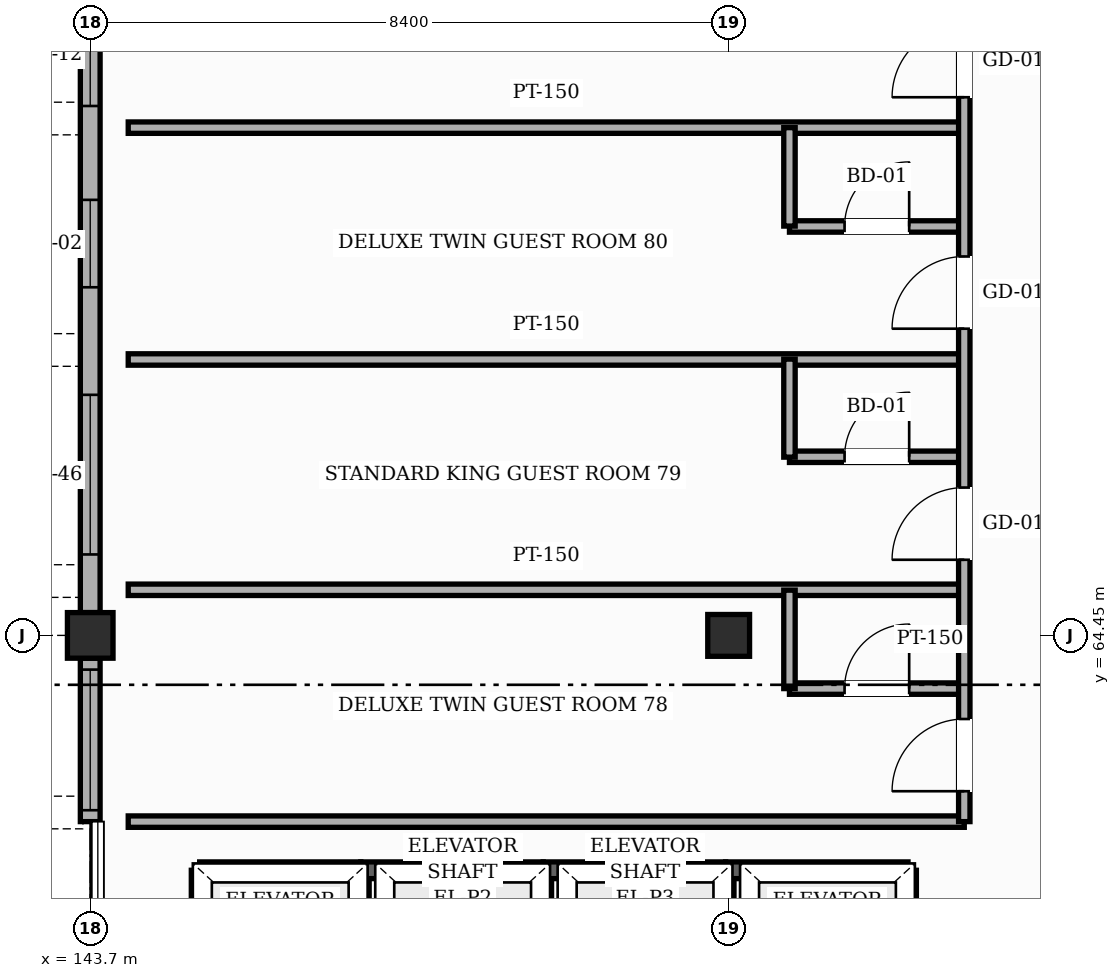
"""IFC4 building model, lengths in metres.
Left out: names, types, materials, properties, quantities, classifications, styles, units other than length and angle.
Written with IfcOpenShell. Run it as: python <this file> out.ifc"""

import sys

from ifc_helpers import new_model, si_unit, direction, frame, frame_2d, origin, origin_2d, place, context, subcontext, project, spatial, rectangle, hollow_rectangle, extrude, element, fill, save


model = new_model("IFC4")
c1 = context("Model", 3, precision=1e-05, world=origin(), true_north=direction((0.0, 1.0)))
c2 = subcontext(c1, "Body", "Model", "MODEL_VIEW")
j1 = project(units=[si_unit("LENGTHUNIT", "METRE"), si_unit("PLANEANGLEUNIT", "RADIAN")], contexts=[c1])
p1 = place(None, origin())
s1 = spatial("IfcSite", under=j1, at=p1, CompositionType="ELEMENT")
p2 = place(p1, origin())
s2 = spatial("IfcBuilding", under=s1, at=p2, CompositionType="ELEMENT")
p3 = place(p2, frame((0.0, 0.0, 24.6)))
s3 = spatial("IfcBuildingStorey", under=s2, at=p3, CompositionType="ELEMENT", Elevation=24.6)
p4 = place(p3, frame((143.7, 64.45, 0.0), z_axis=(0.0, 0.0, 1.0), x_axis=(1.0, 0.0, 0.0)))
e1 = element("IfcColumn", 1, at=p4, inside=s3, PredefinedType="COLUMN", context=c2, shape_type="SweptSolid", body=[
    extrude(hollow_rectangle(XDim=0.6, YDim=0.6, WallThickness=0.025, InnerFilletRadius=0.025, OuterFilletRadius=0.05, at=origin_2d()), origin(), (0.0, 0.0, 1.0), 3.6),
])
p5 = place(p3, frame((152.1, 64.45, 0.0), z_axis=(0.0, 0.0, 1.0), x_axis=(1.0, 0.0, 0.0)))
e2 = element("IfcColumn", 2, at=p5, inside=s3, PredefinedType="COLUMN", context=c2, shape_type="SweptSolid", body=[
    extrude(hollow_rectangle(XDim=0.55, YDim=0.55, WallThickness=0.022, InnerFilletRadius=0.022, OuterFilletRadius=0.044, at=origin_2d()), origin(), (0.0, 0.0, 1.0), 3.6),
])
p6 = place(p3, frame((143.7, 62.0, 0.0), z_axis=(0.0, 0.0, 1.0), x_axis=(0.0, 1.0, 0.0)))
e3 = element("IfcWall", 3, at=p6, inside=s3, PredefinedType="SOLIDWALL", context=c2, shape_type="SweptSolid", body=[
    extrude(rectangle(XDim=2.15, YDim=0.26, at=frame_2d((1.075, 0.0))), origin(), (0.0, 0.0, 1.0), 2.805),
])
p7 = place(p6, frame((0.15, 0.0, 0.85)))
e4 = element("IfcOpeningElement", 4, at=p7, cuts=e3, PredefinedType="OPENING", context=c2, shape_type="SweptSolid", body=[
    extrude(rectangle(XDim=1.85, YDim=1.35, at=frame_2d((0.925, 0.675))), frame((0.0, 0.14, 0.0), z_axis=(0.0, -1.0, 0.0), x_axis=(1.0, 0.0, 0.0)), (0.0, 0.0, 1.0), 0.28),
])
p8 = place(p3, frame((143.7, 64.75, 0.0), z_axis=(0.0, 0.0, 1.0), x_axis=(0.0, 1.0, 0.0)))
e5 = element("IfcWall", 5, at=p8, inside=s3, PredefinedType="SOLIDWALL", context=c2, shape_type="SweptSolid", body=[
    extrude(rectangle(XDim=8.3, YDim=0.26, at=frame_2d((4.15, 0.0))), origin(), (0.0, 0.0, 1.0), 2.655),
])
p9 = place(p8, frame((0.765, 0.0, 0.85)))
e6 = element("IfcOpeningElement", 6, at=p9, cuts=e5, PredefinedType="OPENING", context=c2, shape_type="SweptSolid", body=[
    extrude(rectangle(XDim=2.1, YDim=1.35, at=frame_2d((1.05, 0.675))), frame((0.0, 0.14, 0.0), z_axis=(0.0, -1.0, 0.0), x_axis=(1.0, 0.0, 0.0)), (0.0, 0.0, 1.0), 0.28),
])
p10 = place(p8, frame((4.28, 0.0, 0.85)))
e7 = element("IfcOpeningElement", 7, at=p10, cuts=e5, PredefinedType="OPENING", context=c2, shape_type="SweptSolid", body=[
    extrude(rectangle(XDim=1.15, YDim=1.5, at=frame_2d((0.575, 0.75))), frame((0.0, 0.14, 0.0), z_axis=(0.0, -1.0, 0.0), x_axis=(1.0, 0.0, 0.0)), (0.0, 0.0, 1.0), 0.28),
])
p11 = place(p8, frame((6.665, 0.0, 0.85)))
e8 = element("IfcOpeningElement", 8, at=p11, cuts=e5, PredefinedType="OPENING", context=c2, shape_type="SweptSolid", body=[
    extrude(rectangle(XDim=1.35, YDim=1.5, at=frame_2d((0.675, 0.75))), frame((0.0, 0.14, 0.0), z_axis=(0.0, -1.0, 0.0), x_axis=(1.0, 0.0, 0.0)), (0.0, 0.0, 1.0), 0.28),
])
p12 = place(p3, frame((145.14, 61.36, 0.0), z_axis=(0.0, 0.0, 1.0), x_axis=(1.0, 0.0, 0.0)))
e9 = element("IfcWall", 9, at=p12, inside=s3, PredefinedType="SHEAR", context=c2, shape_type="SweptSolid", body=[
    extrude(rectangle(XDim=2.12, YDim=0.22, at=frame_2d((1.06, 0.0))), origin(), (0.0, 0.0, 1.0), 3.38),
])
for number, where, z_axis, x_axis in (
    (10, (147.26, 59.44, 0.0), (0.0, 0.0, 1.0), (0.0, 1.0, 0.0)),
    (11, (145.14, 59.44, 0.0), (0.0, 0.0, 1.0), (0.0, 1.0, 0.0)),
):
    element("IfcWall", number, at=place(p3, frame(where, z_axis=z_axis, x_axis=x_axis)), inside=s3, PredefinedType="SHEAR", context=c2, shape_type="SweptSolid", body=[
        extrude(rectangle(XDim=1.92, YDim=0.22, at=frame_2d((0.96, 0.0))), origin(), (0.0, 0.0, 1.0), 3.38),
    ])
p13 = place(p3, frame((147.26, 61.36, 0.0), z_axis=(0.0, 0.0, 1.0), x_axis=(1.0, 0.0, 0.0)))
e12 = element("IfcWall", 12, at=p13, inside=s3, PredefinedType="SHEAR", context=c2, shape_type="SweptSolid", body=[
    extrude(rectangle(XDim=2.4, YDim=0.22, at=frame_2d((1.2, 0.0))), origin(), (0.0, 0.0, 1.0), 3.38),
])
p14 = place(p3, frame((149.66, 59.44, 0.0), z_axis=(0.0, 0.0, 1.0), x_axis=(0.0, 1.0, 0.0)))
e13 = element("IfcWall", 13, at=p14, inside=s3, PredefinedType="SHEAR", context=c2, shape_type="SweptSolid", body=[
    extrude(rectangle(XDim=1.92, YDim=0.22, at=frame_2d((0.96, 0.0))), origin(), (0.0, 0.0, 1.0), 3.38),
])
p15 = place(p3, frame((149.66, 61.36, 0.0), z_axis=(0.0, 0.0, 1.0), x_axis=(1.0, 0.0, 0.0)))
e14 = element("IfcWall", 14, at=p15, inside=s3, PredefinedType="SHEAR", context=c2, shape_type="SweptSolid", body=[
    extrude(rectangle(XDim=2.4, YDim=0.22, at=frame_2d((1.2, 0.0))), origin(), (0.0, 0.0, 1.0), 3.38),
])
p16 = place(p3, frame((152.06, 59.44, 0.0), z_axis=(0.0, 0.0, 1.0), x_axis=(0.0, 1.0, 0.0)))
e15 = element("IfcWall", 15, at=p16, inside=s3, PredefinedType="SHEAR", context=c2, shape_type="SweptSolid", body=[
    extrude(rectangle(XDim=1.92, YDim=0.22, at=frame_2d((0.96, 0.0))), origin(), (0.0, 0.0, 1.0), 3.38),
])
p17 = place(p3, frame((152.06, 61.36, 0.0), z_axis=(0.0, 0.0, 1.0), x_axis=(1.0, 0.0, 0.0)))
e16 = element("IfcWall", 16, at=p17, inside=s3, PredefinedType="SHEAR", context=c2, shape_type="SweptSolid", body=[
    extrude(rectangle(XDim=2.4, YDim=0.22, at=frame_2d((1.2, 0.0))), origin(), (0.0, 0.0, 1.0), 3.38),
])
p18 = place(p3, frame((154.46, 59.44, 0.0), z_axis=(0.0, 0.0, 1.0), x_axis=(0.0, 1.0, 0.0)))
e17 = element("IfcWall", 17, at=p18, inside=s3, PredefinedType="SHEAR", context=c2, shape_type="SweptSolid", body=[
    extrude(rectangle(XDim=1.92, YDim=0.22, at=frame_2d((0.96, 0.0))), origin(), (0.0, 0.0, 1.0), 3.38),
])
p19 = place(p3, frame((144.2, 62.0, 0.0), z_axis=(0.0, 0.0, 1.0), x_axis=(1.0, 0.0, 0.0)))
e18 = element("IfcWall", 18, at=p19, inside=s3, PredefinedType="PARTITIONING", context=c2, shape_type="SweptSolid", body=[
    extrude(rectangle(XDim=11.0, YDim=0.15, at=frame_2d((5.5, 0.0))), origin(), (0.0, 0.0, 1.0), 3.365),
])
p20 = place(p3, frame((152.9, 63.75, 0.0), z_axis=(0.0, 0.0, 1.0), x_axis=(1.0, 0.0, 0.0)))
e19 = element("IfcWall", 19, at=p20, inside=s3, PredefinedType="PARTITIONING", context=c2, shape_type="SweptSolid", body=[
    extrude(rectangle(XDim=2.3, YDim=0.15, at=frame_2d((1.15, 0.0))), origin(), (0.0, 0.0, 1.0), 3.365),
])
p21 = place(p20, frame((0.725, 0.0, 0.0)))
e20 = element("IfcOpeningElement", 20, at=p21, cuts=e19, PredefinedType="OPENING", context=c2, shape_type="SweptSolid", body=[
    extrude(rectangle(XDim=0.85, YDim=2.1, at=frame_2d((0.425, 1.05))), frame((0.0, 0.085, 0.0), z_axis=(0.0, -1.0, 0.0), x_axis=(1.0, 0.0, 0.0)), (0.0, 0.0, 1.0), 0.17),
])
p22 = place(p3, frame((144.2, 65.05, 0.0), z_axis=(0.0, 0.0, 1.0), x_axis=(1.0, 0.0, 0.0)))
e21 = element("IfcWall", 21, at=p22, inside=s3, PredefinedType="PARTITIONING", context=c2, shape_type="SweptSolid", body=[
    extrude(rectangle(XDim=11.0, YDim=0.15, at=frame_2d((5.5, 0.0))), origin(), (0.0, 0.0, 1.0), 3.365),
])
p23 = place(p3, frame((152.9, 66.8, 0.0), z_axis=(0.0, 0.0, 1.0), x_axis=(1.0, 0.0, 0.0)))
e22 = element("IfcWall", 22, at=p23, inside=s3, PredefinedType="PARTITIONING", context=c2, shape_type="SweptSolid", body=[
    extrude(rectangle(XDim=2.3, YDim=0.15, at=frame_2d((1.15, 0.0))), origin(), (0.0, 0.0, 1.0), 3.365),
])
p24 = place(p23, frame((0.725, 0.0, 0.0)))
e23 = element("IfcOpeningElement", 23, at=p24, cuts=e22, PredefinedType="OPENING", context=c2, shape_type="SweptSolid", body=[
    extrude(rectangle(XDim=0.85, YDim=2.1, at=frame_2d((0.425, 1.05))), frame((0.0, 0.085, 0.0), z_axis=(0.0, -1.0, 0.0), x_axis=(1.0, 0.0, 0.0)), (0.0, 0.0, 1.0), 0.17),
])
p25 = place(p3, frame((144.2, 68.08, 0.0), z_axis=(0.0, 0.0, 1.0), x_axis=(1.0, 0.0, 0.0)))
e24 = element("IfcWall", 24, at=p25, inside=s3, PredefinedType="PARTITIONING", context=c2, shape_type="SweptSolid", body=[
    extrude(rectangle(XDim=11.0, YDim=0.15, at=frame_2d((5.5, 0.0))), origin(), (0.0, 0.0, 1.0), 3.365),
])
p26 = place(p3, frame((152.9, 69.83, 0.0), z_axis=(0.0, 0.0, 1.0), x_axis=(1.0, 0.0, 0.0)))
e25 = element("IfcWall", 25, at=p26, inside=s3, PredefinedType="PARTITIONING", context=c2, shape_type="SweptSolid", body=[
    extrude(rectangle(XDim=2.3, YDim=0.15, at=frame_2d((1.15, 0.0))), origin(), (0.0, 0.0, 1.0), 3.365),
])
p27 = place(p26, frame((0.725, 0.0, 0.0)))
e26 = element("IfcOpeningElement", 26, at=p27, cuts=e25, PredefinedType="OPENING", context=c2, shape_type="SweptSolid", body=[
    extrude(rectangle(XDim=0.85, YDim=2.1, at=frame_2d((0.425, 1.05))), frame((0.0, 0.085, 0.0), z_axis=(0.0, -1.0, 0.0), x_axis=(1.0, 0.0, 0.0)), (0.0, 0.0, 1.0), 0.17),
])
p28 = place(p3, frame((144.2, 71.13, 0.0), z_axis=(0.0, 0.0, 1.0), x_axis=(1.0, 0.0, 0.0)))
e27 = element("IfcWall", 27, at=p28, inside=s3, PredefinedType="PARTITIONING", context=c2, shape_type="SweptSolid", body=[
    extrude(rectangle(XDim=11.0, YDim=0.15, at=frame_2d((5.5, 0.0))), origin(), (0.0, 0.0, 1.0), 3.365),
])
p29 = place(p3, frame((152.9, 63.75, 0.0), z_axis=(0.0, 0.0, 1.0), x_axis=(0.0, 1.0, 0.0)))
e28 = element("IfcWall", 28, at=p29, inside=s3, PredefinedType="PARTITIONING", context=c2, shape_type="SweptSolid", body=[
    extrude(rectangle(XDim=1.295, YDim=0.15, at=frame_2d((0.647, 0.0))), origin(), (0.0, 0.0, 1.0), 3.365),
])
p30 = place(p3, frame((152.9, 66.795, 0.0), z_axis=(0.0, 0.0, 1.0), x_axis=(0.0, 1.0, 0.0)))
e29 = element("IfcWall", 29, at=p30, inside=s3, PredefinedType="PARTITIONING", context=c2, shape_type="SweptSolid", body=[
    extrude(rectangle(XDim=1.29, YDim=0.15, at=frame_2d((0.645, 0.0))), origin(), (0.0, 0.0, 1.0), 3.365),
])
p31 = place(p3, frame((152.9, 69.835, 0.0), z_axis=(0.0, 0.0, 1.0), x_axis=(0.0, 1.0, 0.0)))
e30 = element("IfcWall", 30, at=p31, inside=s3, PredefinedType="PARTITIONING", context=c2, shape_type="SweptSolid", body=[
    extrude(rectangle(XDim=1.295, YDim=0.15, at=frame_2d((0.647, 0.0))), origin(), (0.0, 0.0, 1.0), 3.365),
])
p32 = place(p3, frame((155.2, 62.0, 0.0), z_axis=(0.0, 0.0, 1.0), x_axis=(0.0, 1.0, 0.0)))
e31 = element("IfcWall", 31, at=p32, inside=s3, PredefinedType="PARTITIONING", context=c2, shape_type="SweptSolid", body=[
    extrude(rectangle(XDim=42.6, YDim=0.15, at=frame_2d((21.3, 0.0))), origin(), (0.0, 0.0, 1.0), 3.365),
])
p33 = place(p32, frame((0.4, 0.0, 0.0)))
e32 = element("IfcOpeningElement", 32, at=p33, cuts=e31, PredefinedType="OPENING", context=c2, shape_type="SweptSolid", body=[
    extrude(rectangle(XDim=0.95, YDim=2.15, at=frame_2d((0.475, 1.075))), frame((0.0, 0.085, 0.0), z_axis=(0.0, -1.0, 0.0), x_axis=(1.0, 0.0, 0.0)), (0.0, 0.0, 1.0), 0.17),
])
p34 = place(p32, frame((3.445, 0.0, 0.0)))
e33 = element("IfcOpeningElement", 33, at=p34, cuts=e31, PredefinedType="OPENING", context=c2, shape_type="SweptSolid", body=[
    extrude(rectangle(XDim=0.95, YDim=2.15, at=frame_2d((0.475, 1.075))), frame((0.0, 0.085, 0.0), z_axis=(0.0, -1.0, 0.0), x_axis=(1.0, 0.0, 0.0)), (0.0, 0.0, 1.0), 0.17),
])
p35 = place(p32, frame((6.485, 0.0, 0.0)))
e34 = element("IfcOpeningElement", 34, at=p35, cuts=e31, PredefinedType="OPENING", context=c2, shape_type="SweptSolid", body=[
    extrude(rectangle(XDim=0.95, YDim=2.15, at=frame_2d((0.475, 1.075))), frame((0.0, 0.085, 0.0), z_axis=(0.0, -1.0, 0.0), x_axis=(1.0, 0.0, 0.0)), (0.0, 0.0, 1.0), 0.17),
])
p36 = place(p32, frame((9.53, 0.0, 0.0)))
e35 = element("IfcOpeningElement", 35, at=p36, cuts=e31, PredefinedType="OPENING", context=c2, shape_type="SweptSolid", body=[
    extrude(rectangle(XDim=0.95, YDim=2.15, at=frame_2d((0.475, 1.075))), frame((0.0, 0.085, 0.0), z_axis=(0.0, -1.0, 0.0), x_axis=(1.0, 0.0, 0.0)), (0.0, 0.0, 1.0), 0.17),
])
p37 = place(p32, frame((12.57, 0.0, 0.0)))
e36 = element("IfcOpeningElement", 36, at=p37, cuts=e31, PredefinedType="OPENING", context=c2, shape_type="SweptSolid", body=[
    extrude(rectangle(XDim=0.95, YDim=2.15, at=frame_2d((0.475, 1.075))), frame((0.0, 0.085, 0.0), z_axis=(0.0, -1.0, 0.0), x_axis=(1.0, 0.0, 0.0)), (0.0, 0.0, 1.0), 0.17),
])
p38 = place(p32, frame((15.615, 0.0, 0.0)))
e37 = element("IfcOpeningElement", 37, at=p38, cuts=e31, PredefinedType="OPENING", context=c2, shape_type="SweptSolid", body=[
    extrude(rectangle(XDim=0.95, YDim=2.15, at=frame_2d((0.475, 1.075))), frame((0.0, 0.085, 0.0), z_axis=(0.0, -1.0, 0.0), x_axis=(1.0, 0.0, 0.0)), (0.0, 0.0, 1.0), 0.17),
])
p39 = place(p32, frame((18.655, 0.0, 0.0)))
e38 = element("IfcOpeningElement", 38, at=p39, cuts=e31, PredefinedType="OPENING", context=c2, shape_type="SweptSolid", body=[
    extrude(rectangle(XDim=0.95, YDim=2.15, at=frame_2d((0.475, 1.075))), frame((0.0, 0.085, 0.0), z_axis=(0.0, -1.0, 0.0), x_axis=(1.0, 0.0, 0.0)), (0.0, 0.0, 1.0), 0.17),
])
p40 = place(p32, frame((21.7, 0.0, 0.0)))
e39 = element("IfcOpeningElement", 39, at=p40, cuts=e31, PredefinedType="OPENING", context=c2, shape_type="SweptSolid", body=[
    extrude(rectangle(XDim=0.95, YDim=2.15, at=frame_2d((0.475, 1.075))), frame((0.0, 0.085, 0.0), z_axis=(0.0, -1.0, 0.0), x_axis=(1.0, 0.0, 0.0)), (0.0, 0.0, 1.0), 0.17),
])
p41 = place(p32, frame((24.745, 0.0, 0.0)))
e40 = element("IfcOpeningElement", 40, at=p41, cuts=e31, PredefinedType="OPENING", context=c2, shape_type="SweptSolid", body=[
    extrude(rectangle(XDim=0.95, YDim=2.15, at=frame_2d((0.475, 1.075))), frame((0.0, 0.085, 0.0), z_axis=(0.0, -1.0, 0.0), x_axis=(1.0, 0.0, 0.0)), (0.0, 0.0, 1.0), 0.17),
])
p42 = place(p32, frame((27.785, 0.0, 0.0)))
e41 = element("IfcOpeningElement", 41, at=p42, cuts=e31, PredefinedType="OPENING", context=c2, shape_type="SweptSolid", body=[
    extrude(rectangle(XDim=0.95, YDim=2.15, at=frame_2d((0.475, 1.075))), frame((0.0, 0.085, 0.0), z_axis=(0.0, -1.0, 0.0), x_axis=(1.0, 0.0, 0.0)), (0.0, 0.0, 1.0), 0.17),
])
p43 = place(p32, frame((30.83, 0.0, 0.0)))
e42 = element("IfcOpeningElement", 42, at=p43, cuts=e31, PredefinedType="OPENING", context=c2, shape_type="SweptSolid", body=[
    extrude(rectangle(XDim=0.95, YDim=2.15, at=frame_2d((0.475, 1.075))), frame((0.0, 0.085, 0.0), z_axis=(0.0, -1.0, 0.0), x_axis=(1.0, 0.0, 0.0)), (0.0, 0.0, 1.0), 0.17),
])
p44 = place(p32, frame((33.87, 0.0, 0.0)))
e43 = element("IfcOpeningElement", 43, at=p44, cuts=e31, PredefinedType="OPENING", context=c2, shape_type="SweptSolid", body=[
    extrude(rectangle(XDim=0.95, YDim=2.15, at=frame_2d((0.475, 1.075))), frame((0.0, 0.085, 0.0), z_axis=(0.0, -1.0, 0.0), x_axis=(1.0, 0.0, 0.0)), (0.0, 0.0, 1.0), 0.17),
])
p45 = place(p32, frame((36.915, 0.0, 0.0)))
e44 = element("IfcOpeningElement", 44, at=p45, cuts=e31, PredefinedType="OPENING", context=c2, shape_type="SweptSolid", body=[
    extrude(rectangle(XDim=0.95, YDim=2.15, at=frame_2d((0.475, 1.075))), frame((0.0, 0.085, 0.0), z_axis=(0.0, -1.0, 0.0), x_axis=(1.0, 0.0, 0.0)), (0.0, 0.0, 1.0), 0.17),
])
p46 = place(p32, frame((39.955, 0.0, 0.0)))
e45 = element("IfcOpeningElement", 45, at=p46, cuts=e31, PredefinedType="OPENING", context=c2, shape_type="SweptSolid", body=[
    extrude(rectangle(XDim=0.95, YDim=2.15, at=frame_2d((0.475, 1.075))), frame((0.0, 0.085, 0.0), z_axis=(0.0, -1.0, 0.0), x_axis=(1.0, 0.0, 0.0)), (0.0, 0.0, 1.0), 0.17),
])
p47 = place(p7, origin())
e46 = element("IfcWindow", 46, at=p47, inside=s3, PartitioningType="SINGLE_PANEL", PredefinedType="WINDOW", context=c2, shape_type="SweptSolid", body=[
    extrude(rectangle(XDim=1.85, YDim=1.35, at=frame_2d((0.925, 0.675))), frame((0.0, 0.03, 0.0), z_axis=(0.0, -1.0, 0.0), x_axis=(1.0, 0.0, 0.0)), (0.0, 0.0, 1.0), 0.06),
])
fill(e4, e46)
p48 = place(p9, origin())
e47 = element("IfcWindow", 47, at=p48, inside=s3, PartitioningType="SINGLE_PANEL", PredefinedType="WINDOW", context=c2, shape_type="SweptSolid", body=[
    extrude(rectangle(XDim=2.1, YDim=1.35, at=frame_2d((1.05, 0.675))), frame((0.0, 0.03, 0.0), z_axis=(0.0, -1.0, 0.0), x_axis=(1.0, 0.0, 0.0)), (0.0, 0.0, 1.0), 0.06),
])
fill(e6, e47)
p49 = place(p10, origin())
e48 = element("IfcWindow", 48, at=p49, inside=s3, PartitioningType="SINGLE_PANEL", PredefinedType="WINDOW", context=c2, shape_type="SweptSolid", body=[
    extrude(rectangle(XDim=1.15, YDim=1.5, at=frame_2d((0.575, 0.75))), frame((0.0, 0.03, 0.0), z_axis=(0.0, -1.0, 0.0), x_axis=(1.0, 0.0, 0.0)), (0.0, 0.0, 1.0), 0.06),
])
fill(e7, e48)
p50 = place(p11, origin())
e49 = element("IfcWindow", 49, at=p50, inside=s3, PartitioningType="SINGLE_PANEL", PredefinedType="WINDOW", context=c2, shape_type="SweptSolid", body=[
    extrude(rectangle(XDim=1.35, YDim=1.5, at=frame_2d((0.675, 0.75))), frame((0.0, 0.03, 0.0), z_axis=(0.0, -1.0, 0.0), x_axis=(1.0, 0.0, 0.0)), (0.0, 0.0, 1.0), 0.06),
])
fill(e8, e49)
p51 = place(p33, origin())
e50 = element("IfcDoor", 50, at=p51, inside=s3, OperationType="SINGLE_SWING_LEFT", PredefinedType="DOOR", context=c2, shape_type="SweptSolid", body=[
    extrude(rectangle(XDim=0.95, YDim=2.15, at=frame_2d((0.475, 1.075))), frame((0.0, 0.025, 0.0), z_axis=(0.0, -1.0, 0.0), x_axis=(1.0, 0.0, 0.0)), (0.0, 0.0, 1.0), 0.05),
])
fill(e32, e50)
p52 = place(p21, origin())
e51 = element("IfcDoor", 51, at=p52, inside=s3, OperationType="SINGLE_SWING_RIGHT", PredefinedType="DOOR", context=c2, shape_type="SweptSolid", body=[
    extrude(rectangle(XDim=0.85, YDim=2.1, at=frame_2d((0.425, 1.05))), frame((0.0, 0.025, 0.0), z_axis=(0.0, -1.0, 0.0), x_axis=(1.0, 0.0, 0.0)), (0.0, 0.0, 1.0), 0.05),
])
fill(e20, e51)
p53 = place(p34, origin())
e52 = element("IfcDoor", 52, at=p53, inside=s3, OperationType="SINGLE_SWING_LEFT", PredefinedType="DOOR", context=c2, shape_type="SweptSolid", body=[
    extrude(rectangle(XDim=0.95, YDim=2.15, at=frame_2d((0.475, 1.075))), frame((0.0, 0.025, 0.0), z_axis=(0.0, -1.0, 0.0), x_axis=(1.0, 0.0, 0.0)), (0.0, 0.0, 1.0), 0.05),
])
fill(e33, e52)
p54 = place(p24, origin())
e53 = element("IfcDoor", 53, at=p54, inside=s3, OperationType="SINGLE_SWING_RIGHT", PredefinedType="DOOR", context=c2, shape_type="SweptSolid", body=[
    extrude(rectangle(XDim=0.85, YDim=2.1, at=frame_2d((0.425, 1.05))), frame((0.0, 0.025, 0.0), z_axis=(0.0, -1.0, 0.0), x_axis=(1.0, 0.0, 0.0)), (0.0, 0.0, 1.0), 0.05),
])
fill(e23, e53)
p55 = place(p35, origin())
e54 = element("IfcDoor", 54, at=p55, inside=s3, OperationType="SINGLE_SWING_LEFT", PredefinedType="DOOR", context=c2, shape_type="SweptSolid", body=[
    extrude(rectangle(XDim=0.95, YDim=2.15, at=frame_2d((0.475, 1.075))), frame((0.0, 0.025, 0.0), z_axis=(0.0, -1.0, 0.0), x_axis=(1.0, 0.0, 0.0)), (0.0, 0.0, 1.0), 0.05),
])
fill(e34, e54)
p56 = place(p27, origin())
e55 = element("IfcDoor", 55, at=p56, inside=s3, OperationType="SINGLE_SWING_RIGHT", PredefinedType="DOOR", context=c2, shape_type="SweptSolid", body=[
    extrude(rectangle(XDim=0.85, YDim=2.1, at=frame_2d((0.425, 1.05))), frame((0.0, 0.025, 0.0), z_axis=(0.0, -1.0, 0.0), x_axis=(1.0, 0.0, 0.0)), (0.0, 0.0, 1.0), 0.05),
])
fill(e26, e55)
p57 = place(p36, origin())
e56 = element("IfcDoor", 56, at=p57, inside=s3, OperationType="SINGLE_SWING_LEFT", PredefinedType="DOOR", context=c2, shape_type="SweptSolid", body=[
    extrude(rectangle(XDim=0.95, YDim=2.15, at=frame_2d((0.475, 1.075))), frame((0.0, 0.025, 0.0), z_axis=(0.0, -1.0, 0.0), x_axis=(1.0, 0.0, 0.0)), (0.0, 0.0, 1.0), 0.05),
])
fill(e35, e56)
save(model, sys.argv[1])
